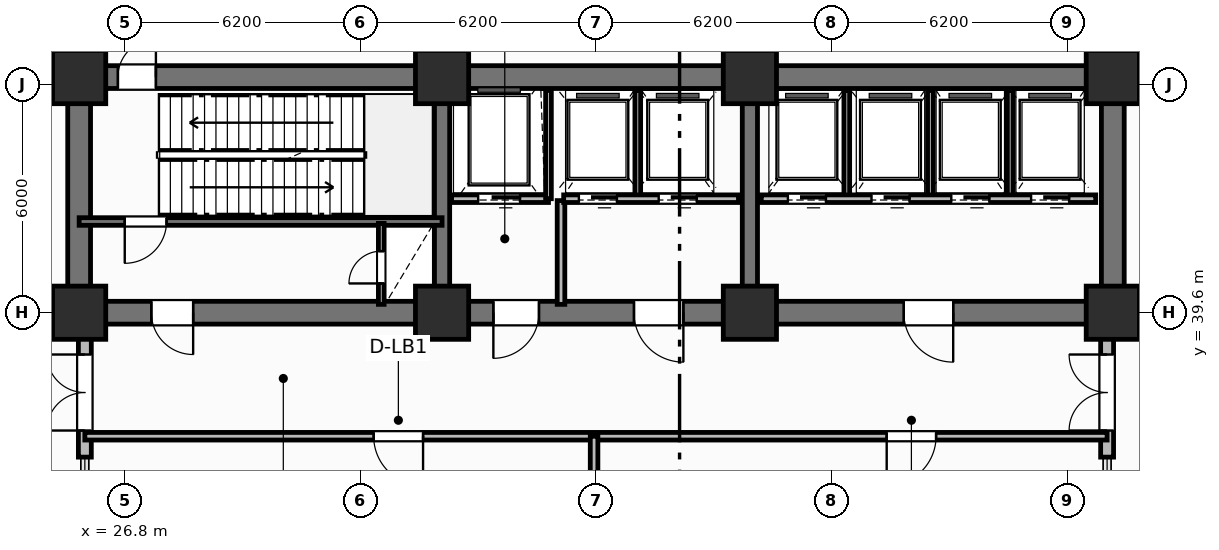
"""IFC4 building model, lengths in metres.
Left out: names, types, materials, properties, quantities, classifications, styles, units other than length and angle.
Written with IfcOpenShell. Run it as: python <this file> out.ifc"""

import sys

from ifc_helpers import new_model, si_unit, direction, frame, frame_2d, origin, origin_2d, place, context, subcontext, project, spatial, rectangle, extrude, element, fill, save


model = new_model("IFC4")
c1 = context("Model", 3, precision=1e-05, world=origin(), true_north=direction((0.0, 1.0)))
c2 = subcontext(c1, "Body", "Model", "MODEL_VIEW")
j1 = project(units=[si_unit("LENGTHUNIT", "METRE"), si_unit("PLANEANGLEUNIT", "RADIAN")], contexts=[c1])
p1 = place(None, origin())
s1 = spatial("IfcSite", under=j1, at=p1, CompositionType="ELEMENT")
p2 = place(p1, origin())
s2 = spatial("IfcBuilding", under=s1, at=p2, CompositionType="ELEMENT")
p3 = place(p2, origin())
s3 = spatial("IfcBuildingStorey", under=s2, at=p3, CompositionType="ELEMENT", Elevation=0.0)
p4 = place(p3, frame((25.6, 45.8, 0.0), z_axis=(0.0, 0.0, 1.0), x_axis=(1.0, 0.0, 0.0)))
e1 = element("IfcWall", 1, at=p4, inside=s3, PredefinedType="SHEAR", context=c2, shape_type="SweptSolid", body=[
    extrude(rectangle(XDim=27.2, YDim=0.6, at=frame_2d((13.6, 0.0))), origin(), (0.0, 0.0, 1.0), 6.6),
])
p5 = place(p4, frame((1.02, 0.0, 0.0)))
e2 = element("IfcOpeningElement", 2, at=p5, cuts=e1, PredefinedType="OPENING", context=c2, shape_type="SweptSolid", body=[
    extrude(rectangle(XDim=1.0, YDim=2.15, at=frame_2d((0.5, 1.075))), frame((0.0, 0.31, 0.0), z_axis=(0.0, -1.0, 0.0), x_axis=(1.0, 0.0, 0.0)), (0.0, 0.0, 1.0), 0.62),
])
for number, where, z_axis, x_axis in (
    (3, (25.6, 39.9, 0.0), (0.0, 0.0, 1.0), (0.0, 1.0, 0.0)),
    (4, (52.8, 39.9, 0.0), (0.0, 0.0, 1.0), (0.0, 1.0, 0.0)),
):
    element("IfcWall", number, at=place(p3, frame(where, z_axis=z_axis, x_axis=x_axis)), inside=s3, PredefinedType="SHEAR", context=c2, shape_type="SweptSolid", body=[
        extrude(rectangle(XDim=5.6, YDim=0.6, at=frame_2d((2.8, 0.0))), origin(), (0.0, 0.0, 1.0), 6.6),
    ])
p6 = place(p3, frame((52.8, 39.6, 0.0), z_axis=(0.0, 0.0, 1.0), x_axis=(-1.0, 0.0, 0.0)))
e5 = element("IfcWall", 5, at=p6, inside=s3, PredefinedType="SHEAR", context=c2, shape_type="SweptSolid", body=[
    extrude(rectangle(XDim=27.2, YDim=0.6, at=frame_2d((13.6, 0.0))), origin(), (0.0, 0.0, 1.0), 6.6),
])
p7 = place(p6, frame((24.2, 0.0, 0.0)))
e6 = element("IfcOpeningElement", 6, at=p7, cuts=e5, PredefinedType="OPENING", context=c2, shape_type="SweptSolid", body=[
    extrude(rectangle(XDim=1.1, YDim=2.15, at=frame_2d((0.55, 1.075))), frame((0.0, 0.31, 0.0), z_axis=(0.0, -1.0, 0.0), x_axis=(1.0, 0.0, 0.0)), (0.0, 0.0, 1.0), 0.62),
])
p8 = place(p6, frame((15.1, 0.0, 0.0)))
e7 = element("IfcOpeningElement", 7, at=p8, cuts=e5, PredefinedType="OPENING", context=c2, shape_type="SweptSolid", body=[
    extrude(rectangle(XDim=1.2, YDim=2.15, at=frame_2d((0.6, 1.075))), frame((0.0, 0.31, 0.0), z_axis=(0.0, -1.0, 0.0), x_axis=(1.0, 0.0, 0.0)), (0.0, 0.0, 1.0), 0.62),
])
p9 = place(p6, frame((11.3, 0.0, 0.0)))
e8 = element("IfcOpeningElement", 8, at=p9, cuts=e5, PredefinedType="OPENING", context=c2, shape_type="SweptSolid", body=[
    extrude(rectangle(XDim=1.3, YDim=2.2, at=frame_2d((0.65, 1.1))), frame((0.0, 0.31, 0.0), z_axis=(0.0, -1.0, 0.0), x_axis=(1.0, 0.0, 0.0)), (0.0, 0.0, 1.0), 0.62),
])
p10 = place(p6, frame((4.2, 0.0, 0.0)))
e9 = element("IfcOpeningElement", 9, at=p10, cuts=e5, PredefinedType="OPENING", context=c2, shape_type="SweptSolid", body=[
    extrude(rectangle(XDim=1.3, YDim=2.2, at=frame_2d((0.65, 1.1))), frame((0.0, 0.31, 0.0), z_axis=(0.0, -1.0, 0.0), x_axis=(1.0, 0.0, 0.0)), (0.0, 0.0, 1.0), 0.62),
])
for number, where, z_axis, x_axis in (
    (10, (35.15, 39.9, 0.0), (0.0, 0.0, 1.0), (0.0, 1.0, 0.0)),
    (11, (43.25, 39.9, 0.0), (0.0, 0.0, 1.0), (0.0, 1.0, 0.0)),
):
    element("IfcWall", number, at=place(p3, frame(where, z_axis=z_axis, x_axis=x_axis)), inside=s3, PredefinedType="SHEAR", context=c2, shape_type="SweptSolid", body=[
        extrude(rectangle(XDim=5.6, YDim=0.4, at=frame_2d((2.8, 0.0))), origin(), (0.0, 0.0, 1.0), 6.6),
    ])
for number, where, z_axis, x_axis in (
    (12, (25.6, 39.6, 0.0), (0.0, 0.0, 1.0), (1.0, 0.0, 0.0)),
    (13, (25.6, 45.8, 0.0), (0.0, 0.0, 1.0), (1.0, 0.0, 0.0)),
    (14, (35.15, 39.6, 0.0), (0.0, 0.0, 1.0), (1.0, 0.0, 0.0)),
    (15, (35.15, 45.8, 0.0), (0.0, 0.0, 1.0), (1.0, 0.0, 0.0)),
    (16, (43.25, 39.6, 0.0), (0.0, 0.0, 1.0), (1.0, 0.0, 0.0)),
    (17, (43.25, 45.8, 0.0), (0.0, 0.0, 1.0), (1.0, 0.0, 0.0)),
    (18, (52.8, 39.6, 0.0), (0.0, 0.0, 1.0), (1.0, 0.0, 0.0)),
    (19, (52.8, 45.8, 0.0), (0.0, 0.0, 1.0), (1.0, 0.0, 0.0)),
):
    element("IfcColumn", number, at=place(p3, frame(where, z_axis=z_axis, x_axis=x_axis)), inside=s3, PredefinedType="COLUMN", context=c2, shape_type="SweptSolid", body=[
        extrude(rectangle(XDim=1.4, YDim=1.4, at=origin_2d()), origin(), (0.0, 0.0, 1.0), 6.6),
    ])
p11 = place(p3, frame((25.75, 35.8, 0.0), z_axis=(0.0, 0.0, 1.0), x_axis=(0.0, 1.0, 0.0)))
e20 = element("IfcWall", 20, at=p11, inside=s3, PredefinedType="SOLIDWALL", context=c2, shape_type="SweptSolid", body=[
    extrude(rectangle(XDim=3.45, YDim=0.34, at=frame_2d((1.725, 0.0))), origin(), (0.0, 0.0, 1.0), 5.58),
])
p12 = place(p11, frame((0.7, 0.0, 0.0)))
e21 = element("IfcOpeningElement", 21, at=p12, cuts=e20, PredefinedType="OPENING", context=c2, shape_type="SweptSolid", body=[
    extrude(rectangle(XDim=2.0, YDim=2.45, at=frame_2d((1.0, 1.225))), frame((0.0, 0.18, 0.0), z_axis=(0.0, -1.0, 0.0), x_axis=(1.0, 0.0, 0.0)), (0.0, 0.0, 1.0), 0.36),
])
p13 = place(p3, frame((52.65, 35.8, 0.0), z_axis=(0.0, 0.0, 1.0), x_axis=(0.0, 1.0, 0.0)))
e22 = element("IfcWall", 22, at=p13, inside=s3, PredefinedType="SOLIDWALL", context=c2, shape_type="SweptSolid", body=[
    extrude(rectangle(XDim=3.45, YDim=0.34, at=frame_2d((1.725, 0.0))), origin(), (0.0, 0.0, 1.0), 5.58),
])
p14 = place(p13, frame((0.7, 0.0, 0.0)))
e23 = element("IfcOpeningElement", 23, at=p14, cuts=e22, PredefinedType="OPENING", context=c2, shape_type="SweptSolid", body=[
    extrude(rectangle(XDim=2.0, YDim=2.45, at=frame_2d((1.0, 1.225))), frame((0.0, 0.18, 0.0), z_axis=(0.0, -1.0, 0.0), x_axis=(1.0, 0.0, 0.0)), (0.0, 0.0, 1.0), 0.36),
])
p15 = place(p3, frame((35.15, 42.0, 0.0), z_axis=(0.0, 0.0, 1.0), x_axis=(-1.0, 0.0, 0.0)))
e24 = element("IfcWall", 24, at=p15, inside=s3, PredefinedType="SHEAR", context=c2, shape_type="SweptSolid", body=[
    extrude(rectangle(XDim=9.55, YDim=0.2, at=frame_2d((4.775, 0.0))), origin(), (0.0, 0.0, 1.0), 6.6),
])
p16 = place(p15, frame((7.25, 0.0, 0.0)))
e25 = element("IfcOpeningElement", 25, at=p16, cuts=e24, PredefinedType="OPENING", context=c2, shape_type="SweptSolid", body=[
    extrude(rectangle(XDim=1.1, YDim=2.15, at=frame_2d((0.55, 1.075))), frame((0.0, 0.11, 0.0), z_axis=(0.0, -1.0, 0.0), x_axis=(1.0, 0.0, 0.0)), (0.0, 0.0, 1.0), 0.22),
])
p17 = place(p3, frame((33.55, 39.82, 0.0), z_axis=(0.0, 0.0, 1.0), x_axis=(0.0, 1.0, 0.0)))
e26 = element("IfcWall", 26, at=p17, inside=s3, PredefinedType="PARTITIONING", context=c2, shape_type="SweptSolid", body=[
    extrude(rectangle(XDim=2.13, YDim=0.15, at=frame_2d((1.065, 0.0))), origin(), (0.0, 0.0, 1.0), 5.52),
])
p18 = place(p17, frame((0.55, 0.0, 0.0)))
e27 = element("IfcOpeningElement", 27, at=p18, cuts=e26, PredefinedType="OPENING", context=c2, shape_type="SweptSolid", body=[
    extrude(rectangle(XDim=0.85, YDim=2.05, at=frame_2d((0.425, 1.025))), frame((0.0, 0.085, 0.0), z_axis=(0.0, -1.0, 0.0), x_axis=(1.0, 0.0, 0.0)), (0.0, 0.0, 1.0), 0.17),
])
p19 = place(p3, frame((37.95, 42.6, 0.0), z_axis=(0.0, 0.0, 1.0), x_axis=(-1.0, 0.0, 0.0)))
e28 = element("IfcWall", 28, at=p19, inside=s3, PredefinedType="PARTITIONING", context=c2, shape_type="SweptSolid", body=[
    extrude(rectangle(XDim=2.55, YDim=0.2, at=frame_2d((1.275, 0.0))), origin(), (0.0, 0.0, 1.0), 5.18),
])
p20 = place(p19, frame((0.75, 0.0, 0.0)))
e29 = element("IfcOpeningElement", 29, at=p20, cuts=e28, PredefinedType="OPENING", context=c2, shape_type="SweptSolid", body=[
    extrude(rectangle(XDim=1.1, YDim=2.15, at=frame_2d((0.55, 1.075))), frame((0.0, 0.11, 0.0), z_axis=(0.0, -1.0, 0.0), x_axis=(1.0, 0.0, 0.0)), (0.0, 0.0, 1.0), 0.22),
])
p21 = place(p3, frame((37.95, 42.6, 0.0), z_axis=(0.0, 0.0, 1.0), x_axis=(0.0, 1.0, 0.0)))
e30 = element("IfcWall", 30, at=p21, inside=s3, PredefinedType="PARTITIONING", context=c2, shape_type="SweptSolid", body=[
    extrude(rectangle(XDim=2.85, YDim=0.15, at=frame_2d((1.425, 0.0))), origin(), (0.0, 0.0, 1.0), 5.52),
])
p22 = place(p3, frame((38.28, 39.82, 0.0), z_axis=(0.0, 0.0, 1.0), x_axis=(0.0, 1.0, 0.0)))
e31 = element("IfcWall", 31, at=p22, inside=s3, PredefinedType="PARTITIONING", context=c2, shape_type="SweptSolid", body=[
    extrude(rectangle(XDim=2.73, YDim=0.2, at=frame_2d((1.365, 0.0))), origin(), (0.0, 0.0, 1.0), 5.52),
])
p23 = place(p3, frame((40.3, 42.65, 0.0), z_axis=(0.0, 0.0, 1.0), x_axis=(0.0, 1.0, 0.0)))
e32 = element("IfcWall", 32, at=p23, inside=s3, PredefinedType="PARTITIONING", context=c2, shape_type="SweptSolid", body=[
    extrude(rectangle(XDim=2.8, YDim=0.15, at=frame_2d((1.4, 0.0))), origin(), (0.0, 0.0, 1.0), 5.52),
])
p24 = place(p3, frame((42.95, 42.6, 0.0), z_axis=(0.0, 0.0, 1.0), x_axis=(-1.0, 0.0, 0.0)))
e33 = element("IfcWall", 33, at=p24, inside=s3, PredefinedType="PARTITIONING", context=c2, shape_type="SweptSolid", body=[
    extrude(rectangle(XDim=4.6, YDim=0.2, at=frame_2d((2.3, 0.0))), origin(), (0.0, 0.0, 1.0), 5.18),
])
p25 = place(p24, frame((3.2, 0.0, 0.0)))
e34 = element("IfcOpeningElement", 34, at=p25, cuts=e33, PredefinedType="OPENING", context=c2, shape_type="SweptSolid", body=[
    extrude(rectangle(XDim=1.0, YDim=2.15, at=frame_2d((0.5, 1.075))), frame((0.0, 0.11, 0.0), z_axis=(0.0, -1.0, 0.0), x_axis=(1.0, 0.0, 0.0)), (0.0, 0.0, 1.0), 0.22),
])
p26 = place(p24, frame((1.1, 0.0, 0.0)))
e35 = element("IfcOpeningElement", 35, at=p26, cuts=e33, PredefinedType="OPENING", context=c2, shape_type="SweptSolid", body=[
    extrude(rectangle(XDim=1.0, YDim=2.15, at=frame_2d((0.5, 1.075))), frame((0.0, 0.11, 0.0), z_axis=(0.0, -1.0, 0.0), x_axis=(1.0, 0.0, 0.0)), (0.0, 0.0, 1.0), 0.22),
])
for number, where, z_axis, x_axis in (
    (36, (45.8, 42.65, 0.0), (0.0, 0.0, 1.0), (0.0, 1.0, 0.0)),
    (37, (48.0, 42.65, 0.0), (0.0, 0.0, 1.0), (0.0, 1.0, 0.0)),
    (38, (50.1, 42.65, 0.0), (0.0, 0.0, 1.0), (0.0, 1.0, 0.0)),
):
    element("IfcWall", number, at=place(p3, frame(where, z_axis=z_axis, x_axis=x_axis)), inside=s3, PredefinedType="PARTITIONING", context=c2, shape_type="SweptSolid", body=[
        extrude(rectangle(XDim=2.8, YDim=0.15, at=frame_2d((1.4, 0.0))), origin(), (0.0, 0.0, 1.0), 5.52),
    ])
p27 = place(p3, frame((52.35, 42.6, 0.0), z_axis=(0.0, 0.0, 1.0), x_axis=(-1.0, 0.0, 0.0)))
e39 = element("IfcWall", 39, at=p27, inside=s3, PredefinedType="PARTITIONING", context=c2, shape_type="SweptSolid", body=[
    extrude(rectangle(XDim=8.8, YDim=0.2, at=frame_2d((4.4, 0.0))), origin(), (0.0, 0.0, 1.0), 5.52),
])
p28 = place(p27, frame((7.1, 0.0, 0.0)))
e40 = element("IfcOpeningElement", 40, at=p28, cuts=e39, PredefinedType="OPENING", context=c2, shape_type="SweptSolid", body=[
    extrude(rectangle(XDim=1.0, YDim=2.15, at=frame_2d((0.5, 1.075))), frame((0.0, 0.11, 0.0), z_axis=(0.0, -1.0, 0.0), x_axis=(1.0, 0.0, 0.0)), (0.0, 0.0, 1.0), 0.22),
])
p29 = place(p27, frame((4.9, 0.0, 0.0)))
e41 = element("IfcOpeningElement", 41, at=p29, cuts=e39, PredefinedType="OPENING", context=c2, shape_type="SweptSolid", body=[
    extrude(rectangle(XDim=1.0, YDim=2.15, at=frame_2d((0.5, 1.075))), frame((0.0, 0.11, 0.0), z_axis=(0.0, -1.0, 0.0), x_axis=(1.0, 0.0, 0.0)), (0.0, 0.0, 1.0), 0.22),
])
p30 = place(p27, frame((2.8, 0.0, 0.0)))
e42 = element("IfcOpeningElement", 42, at=p30, cuts=e39, PredefinedType="OPENING", context=c2, shape_type="SweptSolid", body=[
    extrude(rectangle(XDim=1.0, YDim=2.15, at=frame_2d((0.5, 1.075))), frame((0.0, 0.11, 0.0), z_axis=(0.0, -1.0, 0.0), x_axis=(1.0, 0.0, 0.0)), (0.0, 0.0, 1.0), 0.22),
])
p31 = place(p27, frame((0.7, 0.0, 0.0)))
e43 = element("IfcOpeningElement", 43, at=p31, cuts=e39, PredefinedType="OPENING", context=c2, shape_type="SweptSolid", body=[
    extrude(rectangle(XDim=1.0, YDim=2.15, at=frame_2d((0.5, 1.075))), frame((0.0, 0.11, 0.0), z_axis=(0.0, -1.0, 0.0), x_axis=(1.0, 0.0, 0.0)), (0.0, 0.0, 1.0), 0.22),
])
p32 = place(p3, frame((52.65, 36.35, 0.0), z_axis=(0.0, 0.0, 1.0), x_axis=(-1.0, 0.0, 0.0)))
e44 = element("IfcWall", 44, at=p32, inside=s3, PredefinedType="PARTITIONING", context=c2, shape_type="SweptSolid", body=[
    extrude(rectangle(XDim=26.9, YDim=0.2, at=frame_2d((13.45, 0.0))), origin(), (0.0, 0.0, 1.0), 5.52),
])
p33 = place(p32, frame((4.5, 0.0, 0.0)))
e45 = element("IfcOpeningElement", 45, at=p33, cuts=e44, PredefinedType="OPENING", context=c2, shape_type="SweptSolid", body=[
    extrude(rectangle(XDim=1.3, YDim=2.2, at=frame_2d((0.65, 1.1))), frame((0.0, 0.11, 0.0), z_axis=(0.0, -1.0, 0.0), x_axis=(1.0, 0.0, 0.0)), (0.0, 0.0, 1.0), 0.22),
])
p34 = place(p32, frame((18.0, 0.0, 0.0)))
e46 = element("IfcOpeningElement", 46, at=p34, cuts=e44, PredefinedType="OPENING", context=c2, shape_type="SweptSolid", body=[
    extrude(rectangle(XDim=1.3, YDim=2.2, at=frame_2d((0.65, 1.1))), frame((0.0, 0.11, 0.0), z_axis=(0.0, -1.0, 0.0), x_axis=(1.0, 0.0, 0.0)), (0.0, 0.0, 1.0), 0.22),
])
p35 = place(p3, frame((39.15, 20.05, 0.0), z_axis=(0.0, 0.0, 1.0), x_axis=(0.0, 1.0, 0.0)))
e47 = element("IfcWall", 47, at=p35, inside=s3, PredefinedType="PARTITIONING", context=c2, shape_type="SweptSolid", body=[
    extrude(rectangle(XDim=16.3, YDim=0.2, at=frame_2d((8.15, 0.0))), origin(), (0.0, 0.0, 1.0), 5.52),
])
p36 = place(p12, origin())
e48 = element("IfcDoor", 48, at=p36, inside=s3, OperationType="DOUBLE_DOOR_SINGLE_SWING", PredefinedType="DOOR", context=c2, shape_type="SweptSolid", body=[
    extrude(rectangle(XDim=2.0, YDim=2.45, at=frame_2d((1.0, 1.225))), frame((0.0, 0.025, 0.0), z_axis=(0.0, -1.0, 0.0), x_axis=(1.0, 0.0, 0.0)), (0.0, 0.0, 1.0), 0.05),
])
fill(e21, e48)
p37 = place(p14, origin())
e49 = element("IfcDoor", 49, at=p37, inside=s3, OperationType="DOUBLE_DOOR_SINGLE_SWING", PredefinedType="DOOR", context=c2, shape_type="SweptSolid", body=[
    extrude(rectangle(XDim=2.0, YDim=2.45, at=frame_2d((1.0, 1.225))), frame((0.0, 0.025, 0.0), z_axis=(0.0, -1.0, 0.0), x_axis=(1.0, 0.0, 0.0)), (0.0, 0.0, 1.0), 0.05),
])
fill(e23, e49)
p38 = place(p16, origin())
e50 = element("IfcDoor", 50, at=p38, inside=s3, OperationType="SINGLE_SWING_RIGHT", PredefinedType="DOOR", context=c2, shape_type="SweptSolid", body=[
    extrude(rectangle(XDim=1.1, YDim=2.15, at=frame_2d((0.55, 1.075))), frame((0.0, 0.025, 0.0), z_axis=(0.0, -1.0, 0.0), x_axis=(1.0, 0.0, 0.0)), (0.0, 0.0, 1.0), 0.05),
])
fill(e25, e50)
p39 = place(p18, origin())
e51 = element("IfcDoor", 51, at=p39, inside=s3, OperationType="SINGLE_SWING_LEFT", PredefinedType="TRAPDOOR", context=c2, shape_type="SweptSolid", body=[
    extrude(rectangle(XDim=0.85, YDim=2.05, at=frame_2d((0.425, 1.025))), frame((0.0, 0.025, 0.0), z_axis=(0.0, -1.0, 0.0), x_axis=(1.0, 0.0, 0.0)), (0.0, 0.0, 1.0), 0.05),
])
fill(e27, e51)
p40 = place(p20, origin())
e52 = element("IfcDoor", 52, at=p40, inside=s3, OperationType="SLIDING_TO_LEFT", PredefinedType="DOOR", context=c2, shape_type="SweptSolid", body=[
    extrude(rectangle(XDim=1.1, YDim=2.15, at=frame_2d((0.55, 1.075))), frame((0.0, 0.025, 0.0), z_axis=(0.0, -1.0, 0.0), x_axis=(1.0, 0.0, 0.0)), (0.0, 0.0, 1.0), 0.05),
])
fill(e29, e52)
p41 = place(p25, origin())
e53 = element("IfcDoor", 53, at=p41, inside=s3, OperationType="SLIDING_TO_LEFT", PredefinedType="DOOR", context=c2, shape_type="SweptSolid", body=[
    extrude(rectangle(XDim=1.0, YDim=2.15, at=frame_2d((0.5, 1.075))), frame((0.0, 0.025, 0.0), z_axis=(0.0, -1.0, 0.0), x_axis=(1.0, 0.0, 0.0)), (0.0, 0.0, 1.0), 0.05),
])
fill(e34, e53)
p42 = place(p26, origin())
e54 = element("IfcDoor", 54, at=p42, inside=s3, OperationType="SLIDING_TO_LEFT", PredefinedType="DOOR", context=c2, shape_type="SweptSolid", body=[
    extrude(rectangle(XDim=1.0, YDim=2.15, at=frame_2d((0.5, 1.075))), frame((0.0, 0.025, 0.0), z_axis=(0.0, -1.0, 0.0), x_axis=(1.0, 0.0, 0.0)), (0.0, 0.0, 1.0), 0.05),
])
fill(e35, e54)
p43 = place(p28, origin())
e55 = element("IfcDoor", 55, at=p43, inside=s3, OperationType="SLIDING_TO_LEFT", PredefinedType="DOOR", context=c2, shape_type="SweptSolid", body=[
    extrude(rectangle(XDim=1.0, YDim=2.15, at=frame_2d((0.5, 1.075))), frame((0.0, 0.025, 0.0), z_axis=(0.0, -1.0, 0.0), x_axis=(1.0, 0.0, 0.0)), (0.0, 0.0, 1.0), 0.05),
])
fill(e40, e55)
p44 = place(p29, origin())
e56 = element("IfcDoor", 56, at=p44, inside=s3, OperationType="SLIDING_TO_LEFT", PredefinedType="DOOR", context=c2, shape_type="SweptSolid", body=[
    extrude(rectangle(XDim=1.0, YDim=2.15, at=frame_2d((0.5, 1.075))), frame((0.0, 0.025, 0.0), z_axis=(0.0, -1.0, 0.0), x_axis=(1.0, 0.0, 0.0)), (0.0, 0.0, 1.0), 0.05),
])
fill(e41, e56)
p45 = place(p30, origin())
e57 = element("IfcDoor", 57, at=p45, inside=s3, OperationType="SLIDING_TO_LEFT", PredefinedType="DOOR", context=c2, shape_type="SweptSolid", body=[
    extrude(rectangle(XDim=1.0, YDim=2.15, at=frame_2d((0.5, 1.075))), frame((0.0, 0.025, 0.0), z_axis=(0.0, -1.0, 0.0), x_axis=(1.0, 0.0, 0.0)), (0.0, 0.0, 1.0), 0.05),
])
fill(e42, e57)
p46 = place(p31, origin())
e58 = element("IfcDoor", 58, at=p46, inside=s3, OperationType="SLIDING_TO_LEFT", PredefinedType="DOOR", context=c2, shape_type="SweptSolid", body=[
    extrude(rectangle(XDim=1.0, YDim=2.15, at=frame_2d((0.5, 1.075))), frame((0.0, 0.025, 0.0), z_axis=(0.0, -1.0, 0.0), x_axis=(1.0, 0.0, 0.0)), (0.0, 0.0, 1.0), 0.05),
])
fill(e43, e58)
p47 = place(p33, origin())
e59 = element("IfcDoor", 59, at=p47, inside=s3, OperationType="SINGLE_SWING_RIGHT", PredefinedType="DOOR", context=c2, shape_type="SweptSolid", body=[
    extrude(rectangle(XDim=1.3, YDim=2.2, at=frame_2d((0.65, 1.1))), frame((0.0, 0.025, 0.0), z_axis=(0.0, -1.0, 0.0), x_axis=(1.0, 0.0, 0.0)), (0.0, 0.0, 1.0), 0.05),
])
fill(e45, e59)
p48 = place(p34, origin())
e60 = element("IfcDoor", 60, at=p48, inside=s3, OperationType="SINGLE_SWING_LEFT", PredefinedType="DOOR", context=c2, shape_type="SweptSolid", body=[
    extrude(rectangle(XDim=1.3, YDim=2.2, at=frame_2d((0.65, 1.1))), frame((0.0, 0.025, 0.0), z_axis=(0.0, -1.0, 0.0), x_axis=(1.0, 0.0, 0.0)), (0.0, 0.0, 1.0), 0.05),
])
fill(e46, e60)
p49 = place(p5, origin())
e61 = element("IfcDoor", 61, at=p49, inside=s3, OperationType="SINGLE_SWING_RIGHT", PredefinedType="DOOR", context=c2, shape_type="SweptSolid", body=[
    extrude(rectangle(XDim=1.0, YDim=2.15, at=frame_2d((0.5, 1.075))), frame((0.0, 0.025, 0.0), z_axis=(0.0, -1.0, 0.0), x_axis=(1.0, 0.0, 0.0)), (0.0, 0.0, 1.0), 0.05),
])
fill(e2, e61)
p50 = place(p7, origin())
e62 = element("IfcDoor", 62, at=p50, inside=s3, OperationType="SINGLE_SWING_LEFT", PredefinedType="DOOR", context=c2, shape_type="SweptSolid", body=[
    extrude(rectangle(XDim=1.1, YDim=2.15, at=frame_2d((0.55, 1.075))), frame((0.0, 0.025, 0.0), z_axis=(0.0, -1.0, 0.0), x_axis=(1.0, 0.0, 0.0)), (0.0, 0.0, 1.0), 0.05),
])
fill(e6, e62)
p51 = place(p8, origin())
e63 = element("IfcDoor", 63, at=p51, inside=s3, OperationType="SINGLE_SWING_RIGHT", PredefinedType="DOOR", context=c2, shape_type="SweptSolid", body=[
    extrude(rectangle(XDim=1.2, YDim=2.15, at=frame_2d((0.6, 1.075))), frame((0.0, 0.025, 0.0), z_axis=(0.0, -1.0, 0.0), x_axis=(1.0, 0.0, 0.0)), (0.0, 0.0, 1.0), 0.05),
])
fill(e7, e63)
p52 = place(p9, origin())
e64 = element("IfcDoor", 64, at=p52, inside=s3, OperationType="SINGLE_SWING_LEFT", PredefinedType="DOOR", context=c2, shape_type="SweptSolid", body=[
    extrude(rectangle(XDim=1.3, YDim=2.2, at=frame_2d((0.65, 1.1))), frame((0.0, 0.025, 0.0), z_axis=(0.0, -1.0, 0.0), x_axis=(1.0, 0.0, 0.0)), (0.0, 0.0, 1.0), 0.05),
])
fill(e8, e64)
p53 = place(p10, origin())
e65 = element("IfcDoor", 65, at=p53, inside=s3, OperationType="SINGLE_SWING_LEFT", PredefinedType="DOOR", context=c2, shape_type="SweptSolid", body=[
    extrude(rectangle(XDim=1.3, YDim=2.2, at=frame_2d((0.65, 1.1))), frame((0.0, 0.025, 0.0), z_axis=(0.0, -1.0, 0.0), x_axis=(1.0, 0.0, 0.0)), (0.0, 0.0, 1.0), 0.05),
])
fill(e9, e65)
save(model, sys.argv[1])
